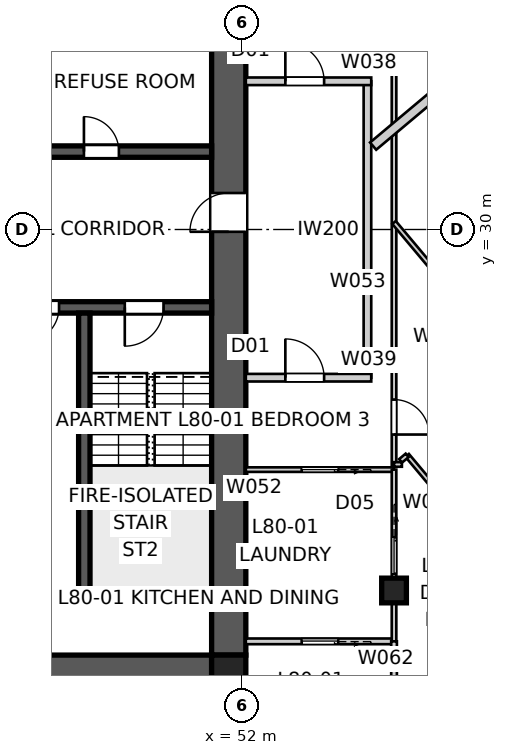
"""IFC4 building model, lengths in metres.
Left out: names, types, materials, properties, quantities, classifications, styles, units other than length and angle.
Written with IfcOpenShell. Run it as: python <this file> out.ifc"""

import sys

from ifc_helpers import new_model, si_unit, direction, frame, frame_2d, origin, origin_2d, place, context, subcontext, project, spatial, polyline, rectangle, outline, extrude, element, fill, save


model = new_model("IFC4")
c1 = context("Model", 3, precision=1e-05, world=origin(), true_north=direction((0.0, 1.0)))
c2 = subcontext(c1, "Body", "Model", "MODEL_VIEW")
j1 = project(units=[si_unit("LENGTHUNIT", "METRE"), si_unit("PLANEANGLEUNIT", "RADIAN")], contexts=[c1])
p1 = place(None, origin())
s1 = spatial("IfcSite", under=j1, at=p1, CompositionType="ELEMENT")
p2 = place(p1, origin())
s2 = spatial("IfcBuilding", under=s1, at=p2, CompositionType="ELEMENT")
p3 = place(p2, frame((0.0, 0.0, 289.6)))
s3 = spatial("IfcBuildingStorey", under=s2, at=p3, CompositionType="ELEMENT", Elevation=289.6)
p4 = place(p3, frame((51.2, 18.35, 0.0), z_axis=(0.0, 0.0, 1.0), x_axis=(-1.0, 0.0, 0.0)))
e1 = element("IfcWall", 1, at=p4, inside=s3, PredefinedType="SHEAR", context=c2, shape_type="SweptSolid", body=[
    extrude(outline(polyline([(0.0, -0.45), (22.4, -0.45), (22.4, -0.025), (22.85, -0.025), (22.85, 0.025), (22.4, 0.025), (22.4, 0.45), (0.0, 0.45), (0.0, 0.025), (-0.45, 0.025), (-0.45, -0.025), (0.0, -0.025), (0.0, -0.45)])), origin(), (0.0, 0.0, 1.0), 3.4),
])
p5 = place(p3, frame((51.65, 18.8, 0.0), z_axis=(0.0, 0.0, 1.0), x_axis=(0.0, 1.0, 0.0)))
e2 = element("IfcWall", 2, at=p5, inside=s3, PredefinedType="SHEAR", context=c2, shape_type="SweptSolid", body=[
    extrude(outline(polyline([(0.0, -0.45), (22.4, -0.45), (22.4, -0.025), (22.85, -0.025), (22.85, 0.025), (22.4, 0.025), (22.4, 0.45), (0.0, 0.45), (0.0, 0.025), (-0.45, 0.025), (-0.45, -0.025), (0.0, -0.025), (0.0, -0.45)])), origin(), (0.0, 0.0, 1.0), 3.4),
])
p6 = place(p5, frame((11.14, 0.0, 0.0)))
e3 = element("IfcOpeningElement", 3, at=p6, cuts=e2, PredefinedType="OPENING", context=c2, shape_type="SweptSolid", body=[
    extrude(rectangle(XDim=1.02, YDim=2.4, at=frame_2d((0.51, 1.2))), frame((0.0, 0.46, 0.0), z_axis=(0.0, -1.0, 0.0), x_axis=(1.0, 0.0, 0.0)), (0.0, 0.0, 1.0), 0.92),
])
p7 = place(p3, frame((28.8, 32.05, 0.0), z_axis=(0.0, 0.0, 1.0), x_axis=(1.0, 0.0, 0.0)))
e4 = element("IfcWall", 4, at=p7, inside=s3, PredefinedType="SHEAR", context=c2, shape_type="SweptSolid", body=[
    extrude(rectangle(XDim=22.4, YDim=0.3, at=frame_2d((11.2, 0.0))), origin(), (0.0, 0.0, 1.0), 3.4),
])
p8 = place(p7, frame((19.04, 0.0, 0.0)))
e5 = element("IfcOpeningElement", 5, at=p8, cuts=e4, PredefinedType="OPENING", context=c2, shape_type="SweptSolid", body=[
    extrude(rectangle(XDim=0.92, YDim=2.1, at=frame_2d((0.46, 1.05))), frame((0.0, 0.16, 0.0), z_axis=(0.0, -1.0, 0.0), x_axis=(1.0, 0.0, 0.0)), (0.0, 0.0, 1.0), 0.32),
])
p9 = place(p7, frame((1.265, 0.0, 0.0)))
e6 = element("IfcOpeningElement", 6, at=p9, cuts=e4, PredefinedType="OPENING", context=c2, shape_type="SweptSolid", body=[
    extrude(rectangle(XDim=1.02, YDim=2.1, at=frame_2d((0.51, 1.05))), frame((0.0, 0.16, 0.0), z_axis=(0.0, -1.0, 0.0), x_axis=(1.0, 0.0, 0.0)), (0.0, 0.0, 1.0), 0.32),
])
p10 = place(p7, frame((4.015, 0.0, 0.0)))
e7 = element("IfcOpeningElement", 7, at=p10, cuts=e4, PredefinedType="OPENING", context=c2, shape_type="SweptSolid", body=[
    extrude(rectangle(XDim=0.92, YDim=2.1, at=frame_2d((0.46, 1.05))), frame((0.0, 0.16, 0.0), z_axis=(0.0, -1.0, 0.0), x_axis=(1.0, 0.0, 0.0)), (0.0, 0.0, 1.0), 0.32),
])
p11 = place(p7, frame((7.015, 0.0, 0.0)))
e8 = element("IfcOpeningElement", 8, at=p11, cuts=e4, PredefinedType="OPENING", context=c2, shape_type="SweptSolid", body=[
    extrude(rectangle(XDim=0.92, YDim=2.1, at=frame_2d((0.46, 1.05))), frame((0.0, 0.16, 0.0), z_axis=(0.0, -1.0, 0.0), x_axis=(1.0, 0.0, 0.0)), (0.0, 0.0, 1.0), 0.32),
])
p12 = place(p7, frame((9.34, 0.0, 0.0)))
e9 = element("IfcOpeningElement", 9, at=p12, cuts=e4, PredefinedType="OPENING", context=c2, shape_type="SweptSolid", body=[
    extrude(rectangle(XDim=0.92, YDim=2.1, at=frame_2d((0.46, 1.05))), frame((0.0, 0.16, 0.0), z_axis=(0.0, -1.0, 0.0), x_axis=(1.0, 0.0, 0.0)), (0.0, 0.0, 1.0), 0.32),
])
p13 = place(p7, frame((12.05, 0.0, 0.0)))
e10 = element("IfcOpeningElement", 10, at=p13, cuts=e4, PredefinedType="OPENING", context=c2, shape_type="SweptSolid", body=[
    extrude(rectangle(XDim=1.1, YDim=2.1, at=frame_2d((0.55, 1.05))), frame((0.0, 0.16, 0.0), z_axis=(0.0, -1.0, 0.0), x_axis=(1.0, 0.0, 0.0)), (0.0, 0.0, 1.0), 0.32),
])
p14 = place(p7, frame((14.85, 0.0, 0.0)))
e11 = element("IfcOpeningElement", 11, at=p14, cuts=e4, PredefinedType="OPENING", context=c2, shape_type="SweptSolid", body=[
    extrude(rectangle(XDim=1.1, YDim=2.1, at=frame_2d((0.55, 1.05))), frame((0.0, 0.16, 0.0), z_axis=(0.0, -1.0, 0.0), x_axis=(1.0, 0.0, 0.0)), (0.0, 0.0, 1.0), 0.32),
])
p15 = place(p3, frame((51.2, 27.95, 0.0), z_axis=(0.0, 0.0, 1.0), x_axis=(-1.0, 0.0, 0.0)))
e12 = element("IfcWall", 12, at=p15, inside=s3, PredefinedType="SHEAR", context=c2, shape_type="SweptSolid", body=[
    extrude(rectangle(XDim=22.4, YDim=0.3, at=frame_2d((11.2, 0.0))), origin(), (0.0, 0.0, 1.0), 3.4),
])
p16 = place(p15, frame((19.04, 0.0, 0.0)))
e13 = element("IfcOpeningElement", 13, at=p16, cuts=e12, PredefinedType="OPENING", context=c2, shape_type="SweptSolid", body=[
    extrude(rectangle(XDim=0.92, YDim=2.1, at=frame_2d((0.46, 1.05))), frame((0.0, 0.16, 0.0), z_axis=(0.0, -1.0, 0.0), x_axis=(1.0, 0.0, 0.0)), (0.0, 0.0, 1.0), 0.32),
])
p17 = place(p15, frame((1.265, 0.0, 0.0)))
e14 = element("IfcOpeningElement", 14, at=p17, cuts=e12, PredefinedType="OPENING", context=c2, shape_type="SweptSolid", body=[
    extrude(rectangle(XDim=1.02, YDim=2.1, at=frame_2d((0.51, 1.05))), frame((0.0, 0.16, 0.0), z_axis=(0.0, -1.0, 0.0), x_axis=(1.0, 0.0, 0.0)), (0.0, 0.0, 1.0), 0.32),
])
p18 = place(p15, frame((4.015, 0.0, 0.0)))
e15 = element("IfcOpeningElement", 15, at=p18, cuts=e12, PredefinedType="OPENING", context=c2, shape_type="SweptSolid", body=[
    extrude(rectangle(XDim=0.92, YDim=2.1, at=frame_2d((0.46, 1.05))), frame((0.0, 0.16, 0.0), z_axis=(0.0, -1.0, 0.0), x_axis=(1.0, 0.0, 0.0)), (0.0, 0.0, 1.0), 0.32),
])
p19 = place(p15, frame((9.79, 0.0, 0.0)))
e16 = element("IfcOpeningElement", 16, at=p19, cuts=e12, PredefinedType="OPENING", context=c2, shape_type="SweptSolid", body=[
    extrude(rectangle(XDim=0.92, YDim=2.1, at=frame_2d((0.46, 1.05))), frame((0.0, 0.16, 0.0), z_axis=(0.0, -1.0, 0.0), x_axis=(1.0, 0.0, 0.0)), (0.0, 0.0, 1.0), 0.32),
])
p20 = place(p15, frame((6.115, 0.0, 0.0)))
e17 = element("IfcOpeningElement", 17, at=p20, cuts=e12, PredefinedType="OPENING", context=c2, shape_type="SweptSolid", body=[
    extrude(rectangle(XDim=0.92, YDim=2.1, at=frame_2d((0.46, 1.05))), frame((0.0, 0.16, 0.0), z_axis=(0.0, -1.0, 0.0), x_axis=(1.0, 0.0, 0.0)), (0.0, 0.0, 1.0), 0.32),
])
p21 = place(p15, frame((12.05, 0.0, 0.0)))
e18 = element("IfcOpeningElement", 18, at=p21, cuts=e12, PredefinedType="OPENING", context=c2, shape_type="SweptSolid", body=[
    extrude(rectangle(XDim=1.1, YDim=2.1, at=frame_2d((0.55, 1.05))), frame((0.0, 0.16, 0.0), z_axis=(0.0, -1.0, 0.0), x_axis=(1.0, 0.0, 0.0)), (0.0, 0.0, 1.0), 0.32),
])
p22 = place(p15, frame((14.85, 0.0, 0.0)))
e19 = element("IfcOpeningElement", 19, at=p22, cuts=e12, PredefinedType="OPENING", context=c2, shape_type="SweptSolid", body=[
    extrude(rectangle(XDim=1.1, YDim=2.1, at=frame_2d((0.55, 1.05))), frame((0.0, 0.16, 0.0), z_axis=(0.0, -1.0, 0.0), x_axis=(1.0, 0.0, 0.0)), (0.0, 0.0, 1.0), 0.32),
])
p23 = place(p3, frame((47.85, 27.8, 0.0), z_axis=(0.0, 0.0, 1.0), x_axis=(0.0, -1.0, 0.0)))
e20 = element("IfcWall", 20, at=p23, inside=s3, PredefinedType="SHEAR", context=c2, shape_type="SweptSolid", body=[
    extrude(rectangle(XDim=7.7, YDim=0.3, at=frame_2d((3.85, 0.0))), origin(), (0.0, 0.0, 1.0), 3.4),
])
p24 = place(p3, frame((51.2, 20.25, 0.0), z_axis=(0.0, 0.0, 1.0), x_axis=(-1.0, 0.0, 0.0)))
e21 = element("IfcWall", 21, at=p24, inside=s3, PredefinedType="SHEAR", context=c2, shape_type="SweptSolid", body=[
    extrude(rectangle(XDim=3.5, YDim=0.3, at=frame_2d((1.75, 0.0))), origin(), (0.0, 0.0, 1.0), 3.4),
])
p25 = place(p3, frame((51.65, 18.35, 0.0), z_axis=(0.0, 0.0, 1.0), x_axis=(1.0, 0.0, 0.0)))
e22 = element("IfcColumn", 22, at=p25, inside=s3, PredefinedType="COLUMN", context=c2, shape_type="SweptSolid", body=[
    extrude(rectangle(XDim=0.9, YDim=0.9, at=origin_2d()), origin(), (0.0, 0.0, 1.0), 3.4),
])
p26 = place(p3, frame((56.0, 20.5, 0.0), z_axis=(0.0, 0.0, 1.0), x_axis=(1.0, 0.0, 0.0)))
e23 = element("IfcColumn", 23, at=p26, inside=s3, PredefinedType="COLUMN", context=c2, shape_type="SweptSolid", body=[
    extrude(rectangle(XDim=0.65, YDim=0.65, at=origin_2d()), origin(), (0.0, 0.0, 1.0), 3.4),
])
p27 = place(p3, frame((55.3, 26.1, 0.0), z_axis=(0.0, 0.0, 1.0), x_axis=(0.0, 1.0, 0.0)))
e24 = element("IfcWall", 24, at=p27, inside=s3, PredefinedType="PARTITIONING", context=c2, shape_type="SweptSolid", body=[
    extrude(rectangle(XDim=7.8, YDim=0.2, at=frame_2d((3.9, 0.0))), origin(), (0.0, 0.0, 1.0), 3.25),
])
p28 = place(p3, frame((52.1, 33.9, 0.0), z_axis=(0.0, 0.0, 1.0), x_axis=(1.0, 0.0, 0.0)))
e25 = element("IfcWall", 25, at=p28, inside=s3, PredefinedType="PARTITIONING", context=c2, shape_type="SweptSolid", body=[
    extrude(rectangle(XDim=3.3, YDim=0.2, at=frame_2d((1.65, 0.0))), origin(), (0.0, 0.0, 1.0), 3.25),
])
p29 = place(p28, frame((1.04, 0.0, 0.0)))
e26 = element("IfcOpeningElement", 26, at=p29, cuts=e25, PredefinedType="OPENING", context=c2, shape_type="SweptSolid", body=[
    extrude(rectangle(XDim=1.02, YDim=2.34, at=frame_2d((0.51, 1.17))), frame((0.0, 0.11, 0.0), z_axis=(0.0, -1.0, 0.0), x_axis=(1.0, 0.0, 0.0)), (0.0, 0.0, 1.0), 0.22),
])
p30 = place(p3, frame((52.1, 26.1, 0.0), z_axis=(0.0, 0.0, 1.0), x_axis=(1.0, 0.0, 0.0)))
e27 = element("IfcWall", 27, at=p30, inside=s3, PredefinedType="PARTITIONING", context=c2, shape_type="SweptSolid", body=[
    extrude(rectangle(XDim=3.3, YDim=0.2, at=frame_2d((1.65, 0.0))), origin(), (0.0, 0.0, 1.0), 3.25),
])
p31 = place(p30, frame((1.04, 0.0, 0.0)))
e28 = element("IfcOpeningElement", 28, at=p31, cuts=e27, PredefinedType="OPENING", context=c2, shape_type="SweptSolid", body=[
    extrude(rectangle(XDim=1.02, YDim=2.34, at=frame_2d((0.51, 1.17))), frame((0.0, 0.11, 0.0), z_axis=(0.0, -1.0, 0.0), x_axis=(1.0, 0.0, 0.0)), (0.0, 0.0, 1.0), 0.22),
])
p32 = place(p3, frame((61.007, 36.857, 0.0), z_axis=(0.0, 0.0, 1.0), x_axis=(-0.766054150891, -0.642776040237, 0.0)))
e29 = element("IfcWall", 29, at=p32, inside=s3, PredefinedType="PARTITIONING", context=c2, shape_type="SweptSolid", body=[
    extrude(rectangle(XDim=7.254, YDim=0.25, at=frame_2d((3.627, 0.0))), origin(), (0.0, 0.0, 1.0), 3.25),
])
p33 = place(p3, frame((56.0, 23.681, 0.0), z_axis=(0.0, 0.0, 1.0), x_axis=(-1.0, 0.0, 0.0)))
e30 = element("IfcWall", 30, at=p33, inside=s3, PredefinedType="PARTITIONING", context=c2, shape_type="SweptSolid", body=[
    extrude(rectangle(XDim=3.9, YDim=0.12, at=frame_2d((1.95, 0.0))), origin(), (0.0, 0.0, 1.0), 3.25),
])
p34 = place(p33, frame((1.47, 0.0, 0.0)))
e31 = element("IfcOpeningElement", 31, at=p34, cuts=e30, PredefinedType="OPENING", context=c2, shape_type="SweptSolid", body=[
    extrude(rectangle(XDim=0.96, YDim=2.1, at=frame_2d((0.48, 1.05))), frame((0.0, 0.07, 0.0), z_axis=(0.0, -1.0, 0.0), x_axis=(1.0, 0.0, 0.0)), (0.0, 0.0, 1.0), 0.14),
])
p35 = place(p3, frame((56.0, 42.762, 0.0), z_axis=(0.0, 0.0, 1.0), x_axis=(0.0, -1.0, 0.0)))
e32 = element("IfcWall", 32, at=p35, inside=s3, PredefinedType="PARTITIONING", context=c2, shape_type="SweptSolid", body=[
    extrude(rectangle(XDim=18.995, YDim=0.12, at=frame_2d((9.498, 0.0))), origin(), (0.0, 0.0, 1.0), 2.55),
])
p36 = place(p35, frame((17.238, 0.0, 0.0)))
e33 = element("IfcOpeningElement", 33, at=p36, cuts=e32, PredefinedType="OPENING", context=c2, shape_type="SweptSolid", body=[
    extrude(rectangle(XDim=0.92, YDim=2.34, at=frame_2d((0.46, 1.17))), frame((0.0, 0.07, 0.0), z_axis=(0.0, -1.0, 0.0), x_axis=(1.0, 0.0, 0.0)), (0.0, 0.0, 1.0), 0.14),
])
p37 = place(p35, frame((6.017, 0.0, 0.0)))
e34 = element("IfcOpeningElement", 34, at=p37, cuts=e32, PredefinedType="OPENING", context=c2, shape_type="SweptSolid", body=[
    extrude(rectangle(XDim=0.92, YDim=2.34, at=frame_2d((0.46, 1.17))), frame((0.0, 0.07, 0.0), z_axis=(0.0, -1.0, 0.0), x_axis=(1.0, 0.0, 0.0)), (0.0, 0.0, 1.0), 0.14),
])
p38 = place(p3, frame((56.0, 19.162, 0.0), z_axis=(0.0, 0.0, 1.0), x_axis=(-1.0, 0.0, 0.0)))
e35 = element("IfcWall", 35, at=p38, inside=s3, PredefinedType="SOLIDWALL", context=c2, shape_type="SweptSolid", body=[
    extrude(rectangle(XDim=3.9, YDim=0.15, at=frame_2d((1.95, 0.0))), origin(), (0.0, 0.0, 1.0), 3.25),
])
p39 = place(p38, frame((1.47, 0.0, 0.0)))
e36 = element("IfcOpeningElement", 36, at=p39, cuts=e35, PredefinedType="OPENING", context=c2, shape_type="SweptSolid", body=[
    extrude(rectangle(XDim=0.96, YDim=2.1, at=frame_2d((0.48, 1.05))), frame((0.0, 0.085, 0.0), z_axis=(0.0, -1.0, 0.0), x_axis=(1.0, 0.0, 0.0)), (0.0, 0.0, 1.0), 0.17),
])
p40 = place(p3, frame((56.0, 23.681, 0.0), z_axis=(0.0, 0.0, 1.0), x_axis=(0.0, -1.0, 0.0)))
e37 = element("IfcWall", 37, at=p40, inside=s3, PredefinedType="PARTITIONING", context=c2, shape_type="SweptSolid", body=[
    extrude(rectangle(XDim=4.519, YDim=0.12, at=frame_2d((2.26, 0.0))), origin(), (0.0, 0.0, 1.0), 2.55),
])
p41 = place(p40, frame((1.78, 0.0, 0.0)))
e38 = element("IfcOpeningElement", 38, at=p41, cuts=e37, PredefinedType="OPENING", context=c2, shape_type="SweptSolid", body=[
    extrude(rectangle(XDim=0.96, YDim=2.1, at=frame_2d((0.48, 1.05))), frame((0.0, 0.07, 0.0), z_axis=(0.0, -1.0, 0.0), x_axis=(1.0, 0.0, 0.0)), (0.0, 0.0, 1.0), 0.14),
])
p42 = place(p3, frame((56.0, 19.162, 0.0), z_axis=(0.0, 0.0, 1.0), x_axis=(0.0, -1.0, 0.0)))
e39 = element("IfcWall", 39, at=p42, inside=s3, PredefinedType="SOLIDWALL", context=c2, shape_type="SweptSolid", body=[
    extrude(rectangle(XDim=2.445, YDim=0.15, at=frame_2d((1.222, 0.0))), origin(), (0.0, 0.0, 1.0), 3.25),
])
p43 = place(p3, frame((62.631, 22.281, 0.0), z_axis=(0.0, 0.0, 1.0), x_axis=(-0.64277851249, 0.766052076481, 0.0)))
e40 = element("IfcWall", 40, at=p43, inside=s3, PredefinedType="PARTITIONING", context=c2, shape_type="SweptSolid", body=[
    extrude(rectangle(XDim=10.316, YDim=0.12, at=frame_2d((5.158, 0.0))), origin(), (0.0, 0.0, 1.0), 3.25),
])
p44 = place(p43, frame((4.962, 0.0, 0.0)))
e41 = element("IfcOpeningElement", 41, at=p44, cuts=e40, PredefinedType="OPENING", context=c2, shape_type="SweptSolid", body=[
    extrude(rectangle(XDim=0.92, YDim=2.34, at=frame_2d((0.46, 1.17))), frame((0.0, 0.07, 0.0), z_axis=(0.0, -1.0, 0.0), x_axis=(1.0, 0.0, 0.0)), (0.0, 0.0, 1.0), 0.14),
])
p45 = place(p43, frame((1.525, 0.0, 0.0)))
e42 = element("IfcOpeningElement", 42, at=p45, cuts=e40, PredefinedType="OPENING", context=c2, shape_type="SweptSolid", body=[
    extrude(rectangle(XDim=0.92, YDim=2.34, at=frame_2d((0.46, 1.17))), frame((0.0, 0.07, 0.0), z_axis=(0.0, -1.0, 0.0), x_axis=(1.0, 0.0, 0.0)), (0.0, 0.0, 1.0), 0.14),
])
p46 = place(p3, frame((59.816, 19.919, 0.0), z_axis=(0.0, 0.0, 1.0), x_axis=(-0.642773197476, 0.766056536168, 0.0)))
e43 = element("IfcWall", 43, at=p46, inside=s3, PredefinedType="PARTITIONING", context=c2, shape_type="SweptSolid", body=[
    extrude(rectangle(XDim=5.4, YDim=0.12, at=frame_2d((2.7, 0.0))), origin(), (0.0, 0.0, 1.0), 3.25),
])
p47 = place(p3, frame((56.345, 24.056, 0.0), z_axis=(0.0, 0.0, 1.0), x_axis=(-0.766260492227, -0.642530044474, 0.0)))
e44 = element("IfcWall", 44, at=p47, inside=s3, PredefinedType="PARTITIONING", context=c2, shape_type="SweptSolid", body=[
    extrude(rectangle(XDim=0.225, YDim=0.12, at=frame_2d((0.112, 0.0))), origin(), (0.0, 0.0, 1.0), 3.25),
])
p48 = place(p3, frame((56.207, 23.817, 0.0), z_axis=(0.0, 0.0, 1.0), x_axis=(-1.0, 0.0, 0.0)))
e45 = element("IfcWall", 45, at=p48, inside=s3, PredefinedType="PARTITIONING", context=c2, shape_type="SweptSolid", body=[
    extrude(rectangle(XDim=0.207, YDim=0.12, at=frame_2d((0.104, 0.0))), origin(), (0.0, 0.0, 1.0), 3.25),
])
p49 = place(p3, frame((51.625, 17.9, 0.0), z_axis=(0.0, 0.0, 1.0), x_axis=(0.027925096799, 0.999610018442, 0.0)))
e46 = element("IfcWall", 46, at=p49, inside=s3, PredefinedType="SOLIDWALL", context=c2, shape_type="SweptSolid", body=[
    extrude(rectangle(XDim=0.9, YDim=0.15, at=frame_2d((0.45, 0.0))), origin(), (0.0, 0.0, 1.0), 3.25),
])
p50 = place(p8, origin())
e47 = element("IfcDoor", 47, at=p50, inside=s3, OperationType="SINGLE_SWING_LEFT", PredefinedType="DOOR", context=c2, shape_type="SweptSolid", body=[
    extrude(rectangle(XDim=0.92, YDim=2.1, at=frame_2d((0.46, 1.05))), frame((0.0, 0.025, 0.0), z_axis=(0.0, -1.0, 0.0), x_axis=(1.0, 0.0, 0.0)), (0.0, 0.0, 1.0), 0.05),
])
fill(e5, e47)
p51 = place(p17, origin())
e48 = element("IfcDoor", 48, at=p51, inside=s3, OperationType="SINGLE_SWING_RIGHT", PredefinedType="DOOR", context=c2, shape_type="SweptSolid", body=[
    extrude(rectangle(XDim=1.02, YDim=2.1, at=frame_2d((0.51, 1.05))), frame((0.0, 0.025, 0.0), z_axis=(0.0, -1.0, 0.0), x_axis=(1.0, 0.0, 0.0)), (0.0, 0.0, 1.0), 0.05),
])
fill(e14, e48)
p52 = place(p18, origin())
e49 = element("IfcDoor", 49, at=p52, inside=s3, OperationType="SINGLE_SWING_RIGHT", PredefinedType="DOOR", context=c2, shape_type="SweptSolid", body=[
    extrude(rectangle(XDim=0.92, YDim=2.1, at=frame_2d((0.46, 1.05))), frame((0.0, 0.025, 0.0), z_axis=(0.0, -1.0, 0.0), x_axis=(1.0, 0.0, 0.0)), (0.0, 0.0, 1.0), 0.05),
])
fill(e15, e49)
p53 = place(p31, origin())
e50 = element("IfcDoor", 50, at=p53, inside=s3, OperationType="SINGLE_SWING_LEFT", PredefinedType="DOOR", context=c2, shape_type="SweptSolid", body=[
    extrude(rectangle(XDim=1.02, YDim=2.34, at=frame_2d((0.51, 1.17))), frame((0.0, 0.025, 0.0), z_axis=(0.0, -1.0, 0.0), x_axis=(1.0, 0.0, 0.0)), (0.0, 0.0, 1.0), 0.05),
])
fill(e28, e50)
p54 = place(p29, origin())
e51 = element("IfcDoor", 51, at=p54, inside=s3, OperationType="SINGLE_SWING_LEFT", PredefinedType="DOOR", context=c2, shape_type="SweptSolid", body=[
    extrude(rectangle(XDim=1.02, YDim=2.34, at=frame_2d((0.51, 1.17))), frame((0.0, 0.025, 0.0), z_axis=(0.0, -1.0, 0.0), x_axis=(1.0, 0.0, 0.0)), (0.0, 0.0, 1.0), 0.05),
])
fill(e26, e51)
p55 = place(p36, origin())
e52 = element("IfcDoor", 52, at=p55, inside=s3, OperationType="SINGLE_SWING_RIGHT", PredefinedType="DOOR", context=c2, shape_type="SweptSolid", body=[
    extrude(rectangle(XDim=0.92, YDim=2.34, at=frame_2d((0.46, 1.17))), frame((0.0, 0.025, 0.0), z_axis=(0.0, -1.0, 0.0), x_axis=(1.0, 0.0, 0.0)), (0.0, 0.0, 1.0), 0.05),
])
fill(e33, e52)
p56 = place(p34, origin())
e53 = element("IfcDoor", 53, at=p56, inside=s3, OperationType="SLIDING_TO_LEFT", PredefinedType="DOOR", context=c2, shape_type="SweptSolid", body=[
    extrude(rectangle(XDim=0.96, YDim=2.1, at=frame_2d((0.48, 1.05))), frame((0.0, 0.025, 0.0), z_axis=(0.0, -1.0, 0.0), x_axis=(1.0, 0.0, 0.0)), (0.0, 0.0, 1.0), 0.05),
])
fill(e31, e53)
p57 = place(p41, origin())
e54 = element("IfcDoor", 54, at=p57, inside=s3, OperationType="SLIDING_TO_LEFT", PredefinedType="DOOR", context=c2, shape_type="SweptSolid", body=[
    extrude(rectangle(XDim=0.96, YDim=2.1, at=frame_2d((0.48, 1.05))), frame((0.0, 0.025, 0.0), z_axis=(0.0, -1.0, 0.0), x_axis=(1.0, 0.0, 0.0)), (0.0, 0.0, 1.0), 0.05),
])
fill(e38, e54)
p58 = place(p39, origin())
e55 = element("IfcDoor", 55, at=p58, inside=s3, OperationType="SLIDING_TO_LEFT", PredefinedType="DOOR", context=c2, shape_type="SweptSolid", body=[
    extrude(rectangle(XDim=0.96, YDim=2.1, at=frame_2d((0.48, 1.05))), frame((0.0, 0.025, 0.0), z_axis=(0.0, -1.0, 0.0), x_axis=(1.0, 0.0, 0.0)), (0.0, 0.0, 1.0), 0.05),
])
fill(e36, e55)
p59 = place(p6, origin())
e56 = element("IfcDoor", 56, at=p59, inside=s3, OperationType="SINGLE_SWING_LEFT", PredefinedType="DOOR", context=c2, shape_type="SweptSolid", body=[
    extrude(rectangle(XDim=1.02, YDim=2.4, at=frame_2d((0.51, 1.2))), frame((0.0, 0.025, 0.0), z_axis=(0.0, -1.0, 0.0), x_axis=(1.0, 0.0, 0.0)), (0.0, 0.0, 1.0), 0.05),
])
fill(e3, e56)
save(model, sys.argv[1])
